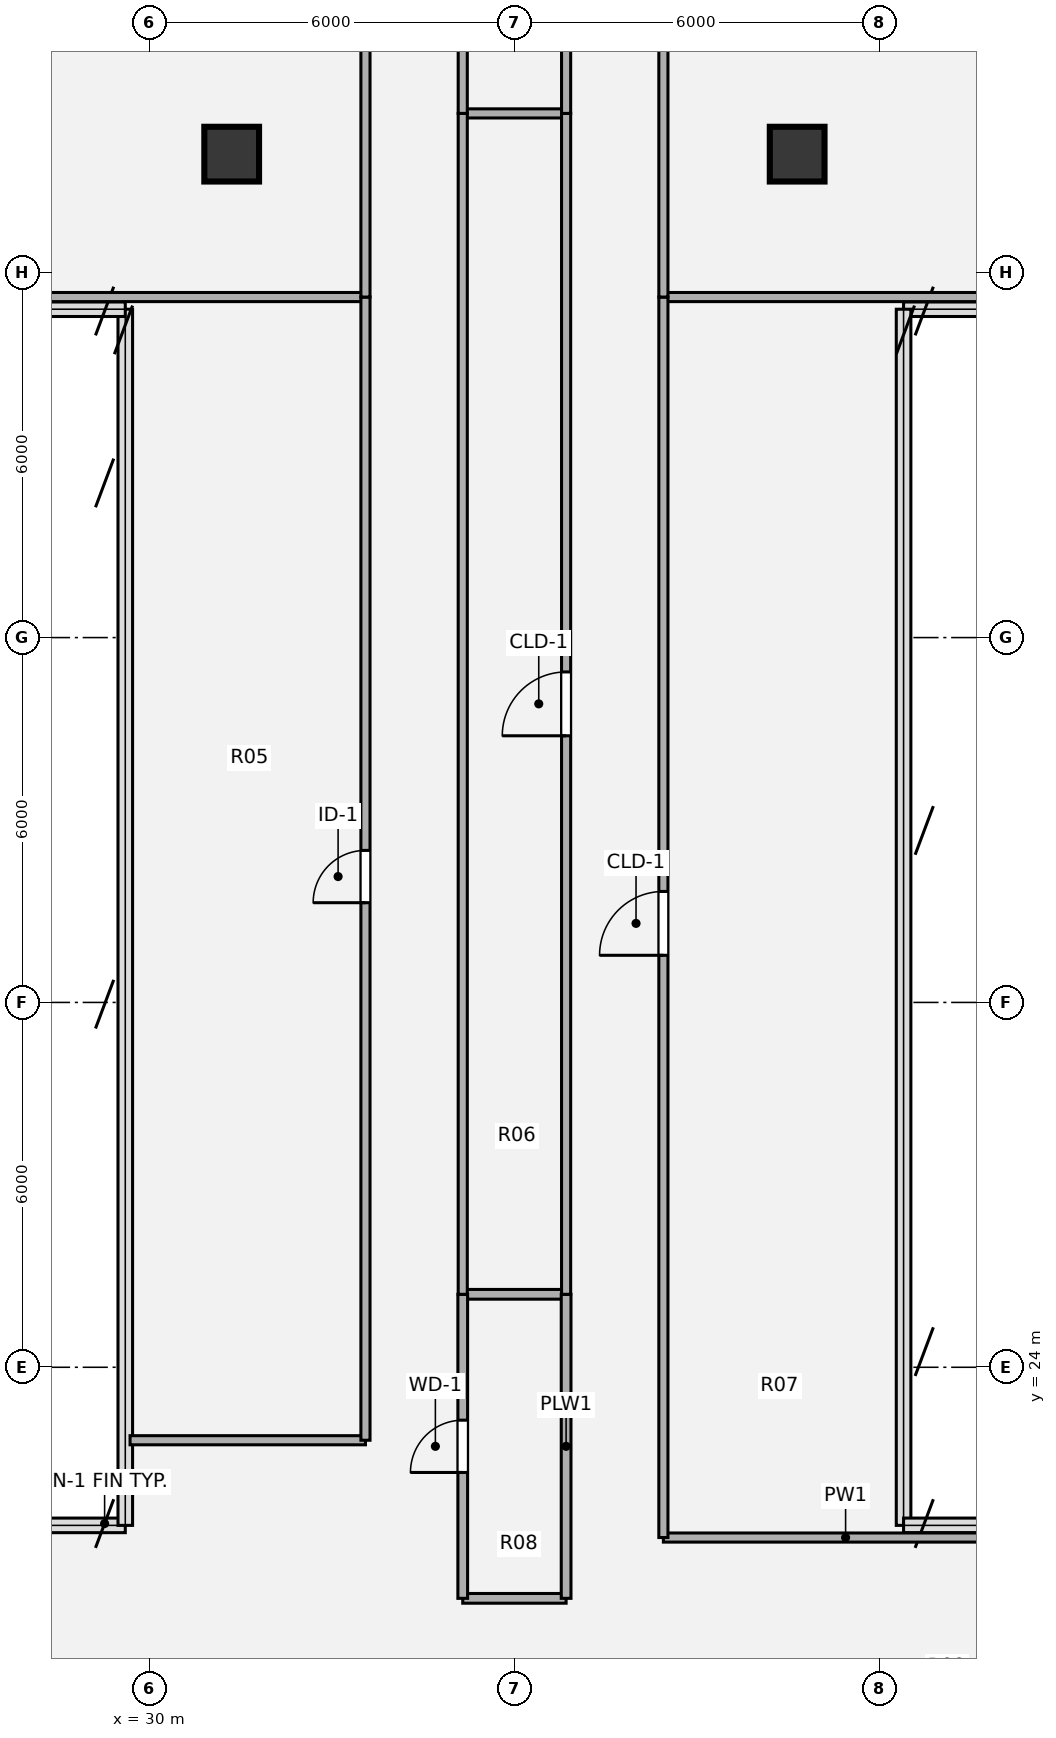
"""IFC4 building model, lengths in metres.
Left out: names, types, materials, properties, quantities, classifications, styles, units other than length and angle.
Written with IfcOpenShell. Run it as: python <this file> out.ifc"""

import sys

from ifc_helpers import new_model, si_unit, direction, frame, frame_2d, origin, origin_2d, place, context, subcontext, project, spatial, rectangle, hollow_circle, extrude, source, transform, mapped, element, fill, save


model = new_model("IFC4")
c1 = context("Model", 3, precision=1e-05, world=origin(), true_north=direction((0.0, 1.0)))
c2 = subcontext(c1, "Body", "Model", "MODEL_VIEW")
j1 = project(units=[si_unit("LENGTHUNIT", "METRE"), si_unit("PLANEANGLEUNIT", "RADIAN")], contexts=[c1])
p1 = place(None, origin())
s1 = spatial("IfcSite", under=j1, at=p1, CompositionType="ELEMENT")
p2 = place(p1, origin())
s2 = spatial("IfcBuilding", under=s1, at=p2, CompositionType="ELEMENT")
p3 = place(p2, frame((0.0, 0.0, 253.26)))
s3 = spatial("IfcBuildingStorey", under=s2, at=p3, CompositionType="ELEMENT", Elevation=253.26)
m1 = source(origin(), c2, "Body", "SweptSolid", [
    extrude(hollow_circle(Radius=0.45, WallThickness=0.032, at=origin_2d()), origin(), (0.0, 0.0, 1.0), 3.78),
])
for number, where, z_axis, x_axis in (
    (1, (31.35, 43.95, 0.0), (0.0, 0.0, 1.0), (1.0, 0.0, 0.0)),
    (2, (40.65, 43.95, 0.0), (0.0, 0.0, 1.0), (1.0, 0.0, 0.0)),
):
    element("IfcColumn", number, at=place(p3, frame(where, z_axis=z_axis, x_axis=x_axis)), inside=s3, PredefinedType="COLUMN", context=c2, shape_type="MappedRepresentation", body=[
        mapped(m1, transform((0.0, 0.0, 0.0), x_axis=(1.0, 0.0, 0.0), y_axis=(0.0, 1.0, 0.0), z_axis=(0.0, 0.0, 1.0), scale=1.0)),
    ])
p4 = place(p3, frame((35.15, 20.2, 0.0), z_axis=(0.0, 0.0, 1.0), x_axis=(1.0, 0.0, 0.0)))
e3 = element("IfcWall", 3, at=p4, inside=s3, PredefinedType="PLUMBINGWALL", context=c2, shape_type="SweptSolid", body=[
    extrude(rectangle(XDim=1.7, YDim=0.16, at=frame_2d((0.85, 0.0))), origin(), (0.0, 0.0, 1.0), 3.5),
])
p5 = place(p3, frame((38.45, 21.2, 0.0), z_axis=(0.0, 0.0, 1.0), x_axis=(1.0, 0.0, 0.0)))
e4 = element("IfcWall", 4, at=p5, inside=s3, PredefinedType="PARTITIONING", context=c2, shape_type="SweptSolid", body=[
    extrude(rectangle(XDim=5.993, YDim=0.15, at=frame_2d((2.997, 0.0))), origin(), (0.0, 0.0, 1.0), 3.5),
])
p6 = place(p3, frame((29.678, 22.8, 0.0), z_axis=(0.0, 0.0, 1.0), x_axis=(1.0, 0.0, 0.0)))
e5 = element("IfcWall", 5, at=p6, inside=s3, PredefinedType="PARTITIONING", context=c2, shape_type="SweptSolid", body=[
    extrude(rectangle(XDim=3.872, YDim=0.15, at=frame_2d((1.936, 0.0))), origin(), (0.0, 0.0, 1.0), 3.5),
])
p7 = place(p3, frame((35.15, 25.2, 0.0), z_axis=(0.0, 0.0, 1.0), x_axis=(1.0, 0.0, 0.0)))
e6 = element("IfcWall", 6, at=p7, inside=s3, PredefinedType="PLUMBINGWALL", context=c2, shape_type="SweptSolid", body=[
    extrude(rectangle(XDim=1.7, YDim=0.16, at=frame_2d((0.85, 0.0))), origin(), (0.0, 0.0, 1.0), 3.5),
])
p8 = place(p3, frame((27.558, 41.6, 0.0), z_axis=(0.0, 0.0, 1.0), x_axis=(1.0, 0.0, 0.0)))
e7 = element("IfcWall", 7, at=p8, inside=s3, PredefinedType="PARTITIONING", context=c2, shape_type="SweptSolid", body=[
    extrude(rectangle(XDim=5.992, YDim=0.15, at=frame_2d((2.996, 0.0))), origin(), (0.0, 0.0, 1.0), 3.5),
])
p9 = place(p3, frame((38.45, 41.6, 0.0), z_axis=(0.0, 0.0, 1.0), x_axis=(1.0, 0.0, 0.0)))
e8 = element("IfcWall", 8, at=p9, inside=s3, PredefinedType="PARTITIONING", context=c2, shape_type="SweptSolid", body=[
    extrude(rectangle(XDim=5.993, YDim=0.15, at=frame_2d((2.997, 0.0))), origin(), (0.0, 0.0, 1.0), 3.5),
])
p10 = place(p3, frame((35.15, 44.62, 0.0), z_axis=(0.0, 0.0, 1.0), x_axis=(1.0, 0.0, 0.0)))
e9 = element("IfcWall", 9, at=p10, inside=s3, PredefinedType="PARTITIONING", context=c2, shape_type="SweptSolid", body=[
    extrude(rectangle(XDim=1.7, YDim=0.15, at=frame_2d((0.85, 0.0))), origin(), (0.0, 0.0, 1.0), 3.259),
])
p11 = place(p3, frame((33.55, 22.8, 0.0), z_axis=(0.0, 0.0, 1.0), x_axis=(0.0, 1.0, 0.0)))
e10 = element("IfcWall", 10, at=p11, inside=s3, PredefinedType="PARTITIONING", context=c2, shape_type="SweptSolid", body=[
    extrude(rectangle(XDim=18.8, YDim=0.15, at=frame_2d((9.4, 0.0))), origin(), (0.0, 0.0, 1.0), 3.5),
])
p12 = place(p11, frame((8.84, 0.0, 0.0)))
e11 = element("IfcOpeningElement", 11, at=p12, cuts=e10, PredefinedType="OPENING", context=c2, shape_type="SweptSolid", body=[
    extrude(rectangle(XDim=0.86, YDim=2.1, at=origin_2d()), frame((0.43, 0.085, 1.05), z_axis=(0.0, -1.0, 0.0), x_axis=(1.0, 0.0, 0.0)), (0.0, 0.0, 1.0), 0.17),
])
p13 = place(p3, frame((33.55, 41.6, 0.0), z_axis=(0.0, 0.0, 1.0), x_axis=(0.0, 1.0, 0.0)))
e12 = element("IfcWall", 12, at=p13, inside=s3, PredefinedType="PARTITIONING", context=c2, shape_type="SweptSolid", body=[
    extrude(rectangle(XDim=17.4, YDim=0.15, at=frame_2d((8.7, 0.0))), origin(), (0.0, 0.0, 1.0), 3.5),
])
p14 = place(p13, frame((8.175, 0.0, 0.0)))
e13 = element("IfcOpeningElement", 13, at=p14, cuts=e12, PredefinedType="OPENING", context=c2, shape_type="SweptSolid", body=[
    extrude(rectangle(XDim=1.05, YDim=2.1, at=origin_2d()), frame((0.525, 0.085, 1.05), z_axis=(0.0, -1.0, 0.0), x_axis=(1.0, 0.0, 0.0)), (0.0, 0.0, 1.0), 0.17),
])
p15 = place(p3, frame((35.15, 20.2, 0.0), z_axis=(0.0, 0.0, 1.0), x_axis=(0.0, 1.0, 0.0)))
e14 = element("IfcWall", 14, at=p15, inside=s3, PredefinedType="PLUMBINGWALL", context=c2, shape_type="SweptSolid", body=[
    extrude(rectangle(XDim=5.0, YDim=0.16, at=frame_2d((2.5, 0.0))), origin(), (0.0, 0.0, 1.0), 3.5),
])
p16 = place(p15, frame((2.07, 0.0, 0.0)))
e15 = element("IfcOpeningElement", 15, at=p16, cuts=e14, PredefinedType="OPENING", context=c2, shape_type="SweptSolid", body=[
    extrude(rectangle(XDim=0.86, YDim=2.1, at=origin_2d()), frame((0.43, 0.09, 1.05), z_axis=(0.0, -1.0, 0.0), x_axis=(1.0, 0.0, 0.0)), (0.0, 0.0, 1.0), 0.18),
])
p17 = place(p3, frame((35.15, 25.2, 0.0), z_axis=(0.0, 0.0, 1.0), x_axis=(0.0, 1.0, 0.0)))
e16 = element("IfcWall", 16, at=p17, inside=s3, PredefinedType="PARTITIONING", context=c2, shape_type="SweptSolid", body=[
    extrude(rectangle(XDim=19.42, YDim=0.15, at=frame_2d((9.71, 0.0))), origin(), (0.0, 0.0, 1.0), 3.5),
])
p18 = place(p3, frame((35.15, 44.62, 0.0), z_axis=(0.0, 0.0, 1.0), x_axis=(0.0, 1.0, 0.0)))
e17 = element("IfcWall", 17, at=p18, inside=s3, PredefinedType="PARTITIONING", context=c2, shape_type="SweptSolid", body=[
    extrude(rectangle(XDim=12.58, YDim=0.15, at=frame_2d((6.29, 0.0))), origin(), (0.0, 0.0, 1.0), 3.5),
])
p19 = place(p18, frame((5.83, 0.0, 0.0)))
e18 = element("IfcOpeningElement", 18, at=p19, cuts=e17, PredefinedType="OPENING", context=c2, shape_type="SweptSolid", body=[
    extrude(rectangle(XDim=0.86, YDim=2.1, at=origin_2d()), frame((0.43, 0.085, 1.05), z_axis=(0.0, -1.0, 0.0), x_axis=(1.0, 0.0, 0.0)), (0.0, 0.0, 1.0), 0.17),
])
p20 = place(p3, frame((36.85, 20.2, 0.0), z_axis=(0.0, 0.0, 1.0), x_axis=(0.0, 1.0, 0.0)))
e19 = element("IfcWall", 19, at=p20, inside=s3, PredefinedType="PLUMBINGWALL", context=c2, shape_type="SweptSolid", body=[
    extrude(rectangle(XDim=5.0, YDim=0.16, at=frame_2d((2.5, 0.0))), origin(), (0.0, 0.0, 1.0), 3.5),
])
p21 = place(p3, frame((36.85, 25.2, 0.0), z_axis=(0.0, 0.0, 1.0), x_axis=(0.0, 1.0, 0.0)))
e20 = element("IfcWall", 20, at=p21, inside=s3, PredefinedType="PARTITIONING", context=c2, shape_type="SweptSolid", body=[
    extrude(rectangle(XDim=19.42, YDim=0.15, at=frame_2d((9.71, 0.0))), origin(), (0.0, 0.0, 1.0), 3.5),
])
p22 = place(p21, frame((9.185, 0.0, 0.0)))
e21 = element("IfcOpeningElement", 21, at=p22, cuts=e20, PredefinedType="OPENING", context=c2, shape_type="SweptSolid", body=[
    extrude(rectangle(XDim=1.05, YDim=2.1, at=origin_2d()), frame((0.525, 0.085, 1.05), z_axis=(0.0, -1.0, 0.0), x_axis=(1.0, 0.0, 0.0)), (0.0, 0.0, 1.0), 0.17),
])
p23 = place(p3, frame((36.85, 44.62, 0.0), z_axis=(0.0, 0.0, 1.0), x_axis=(0.0, 1.0, 0.0)))
e22 = element("IfcWall", 22, at=p23, inside=s3, PredefinedType="PARTITIONING", context=c2, shape_type="SweptSolid", body=[
    extrude(rectangle(XDim=12.58, YDim=0.15, at=frame_2d((6.29, 0.0))), origin(), (0.0, 0.0, 1.0), 3.5),
])
p24 = place(p3, frame((38.45, 21.2, 0.0), z_axis=(0.0, 0.0, 1.0), x_axis=(0.0, 1.0, 0.0)))
e23 = element("IfcWall", 23, at=p24, inside=s3, PredefinedType="PARTITIONING", context=c2, shape_type="SweptSolid", body=[
    extrude(rectangle(XDim=20.4, YDim=0.15, at=frame_2d((10.2, 0.0))), origin(), (0.0, 0.0, 1.0), 3.5),
])
p25 = place(p24, frame((9.575, 0.0, 0.0)))
e24 = element("IfcOpeningElement", 24, at=p25, cuts=e23, PredefinedType="OPENING", context=c2, shape_type="SweptSolid", body=[
    extrude(rectangle(XDim=1.05, YDim=2.1, at=origin_2d()), frame((0.525, 0.085, 1.05), z_axis=(0.0, -1.0, 0.0), x_axis=(1.0, 0.0, 0.0)), (0.0, 0.0, 1.0), 0.17),
])
p26 = place(p3, frame((38.45, 41.6, 0.0), z_axis=(0.0, 0.0, 1.0), x_axis=(0.0, 1.0, 0.0)))
e25 = element("IfcWall", 25, at=p26, inside=s3, PredefinedType="PARTITIONING", context=c2, shape_type="SweptSolid", body=[
    extrude(rectangle(XDim=17.4, YDim=0.15, at=frame_2d((8.7, 0.0))), origin(), (0.0, 0.0, 1.0), 3.5),
])
p27 = place(p26, frame((8.175, 0.0, 0.0)))
e26 = element("IfcOpeningElement", 26, at=p27, cuts=e25, PredefinedType="OPENING", context=c2, shape_type="SweptSolid", body=[
    extrude(rectangle(XDim=1.05, YDim=2.1, at=origin_2d()), frame((0.525, 0.085, 1.05), z_axis=(0.0, -1.0, 0.0), x_axis=(1.0, 0.0, 0.0)), (0.0, 0.0, 1.0), 0.17),
])
m2 = source(origin(), c2, "Body", "SweptSolid", [
    extrude(rectangle(XDim=0.86, YDim=2.1, at=origin_2d()), frame((0.43, 0.025, 1.05), z_axis=(0.0, -1.0, 0.0), x_axis=(1.0, 0.0, 0.0)), (0.0, 0.0, 1.0), 0.05),
])
p28 = place(p12, origin())
e27 = element("IfcDoor", 27, at=p28, inside=s3, OperationType="SINGLE_SWING_LEFT", PredefinedType="DOOR", context=c2, shape_type="MappedRepresentation", body=[
    mapped(m2, transform((0.0, 0.0, 0.0), x_axis=(1.0, 0.0, 0.0), y_axis=(0.0, 1.0, 0.0), z_axis=(0.0, 0.0, 1.0), scale=1.0)),
])
fill(e11, e27)
m3 = source(origin(), c2, "Body", "SweptSolid", [
    extrude(rectangle(XDim=0.86, YDim=2.1, at=origin_2d()), frame((0.43, 0.025, 1.05), z_axis=(0.0, -1.0, 0.0), x_axis=(1.0, 0.0, 0.0)), (0.0, 0.0, 1.0), 0.05),
])
p29 = place(p16, origin())
e28 = element("IfcDoor", 28, at=p29, inside=s3, OperationType="SINGLE_SWING_LEFT", PredefinedType="DOOR", context=c2, shape_type="MappedRepresentation", body=[
    mapped(m3, transform((0.0, 0.0, 0.0), x_axis=(1.0, 0.0, 0.0), y_axis=(0.0, 1.0, 0.0), z_axis=(0.0, 0.0, 1.0), scale=1.0)),
])
fill(e15, e28)
m4 = source(origin(), c2, "Body", "SweptSolid", [
    extrude(rectangle(XDim=1.05, YDim=2.1, at=origin_2d()), frame((0.525, 0.025, 1.05), z_axis=(0.0, -1.0, 0.0), x_axis=(1.0, 0.0, 0.0)), (0.0, 0.0, 1.0), 0.05),
])
p30 = place(p22, origin())
e29 = element("IfcDoor", 29, at=p30, inside=s3, OperationType="SINGLE_SWING_LEFT", PredefinedType="DOOR", context=c2, shape_type="MappedRepresentation", body=[
    mapped(m4, transform((0.0, 0.0, 0.0), x_axis=(1.0, 0.0, 0.0), y_axis=(0.0, 1.0, 0.0), z_axis=(0.0, 0.0, 1.0), scale=1.0)),
])
fill(e21, e29)
p31 = place(p25, origin())
e30 = element("IfcDoor", 30, at=p31, inside=s3, OperationType="SINGLE_SWING_LEFT", PredefinedType="DOOR", context=c2, shape_type="MappedRepresentation", body=[
    mapped(m4, transform((0.0, 0.0, 0.0), x_axis=(1.0, 0.0, 0.0), y_axis=(0.0, 1.0, 0.0), z_axis=(0.0, 0.0, 1.0), scale=1.0)),
])
fill(e24, e30)
save(model, sys.argv[1])
